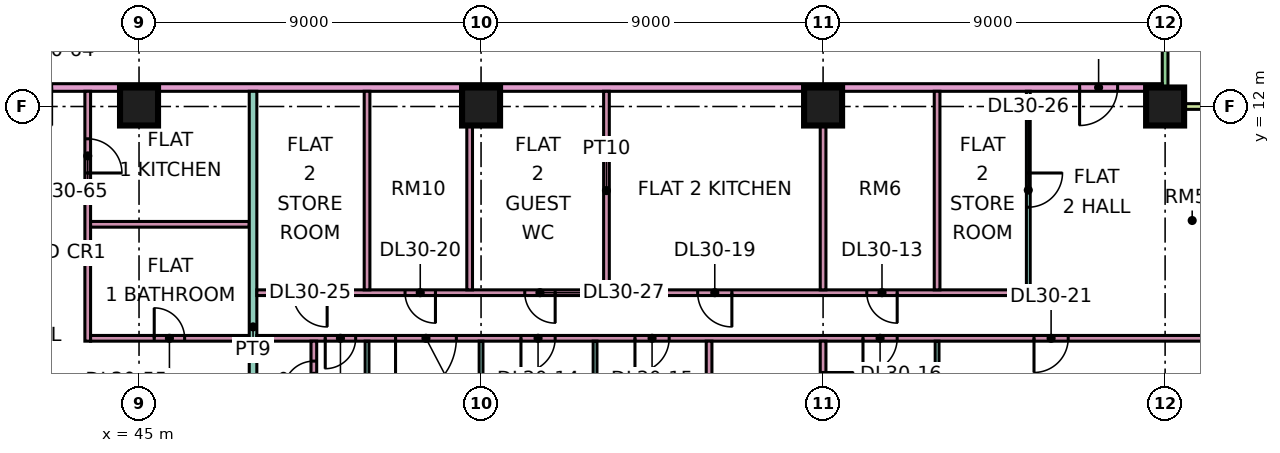
"""IFC4 building model, lengths in metres.
Left out: names, types, materials, properties, quantities, classifications, styles, units other than length and angle.
Written with IfcOpenShell. Run it as: python <this file> out.ifc"""

import sys

from ifc_helpers import new_model, si_unit, direction, frame, frame_2d, origin, origin_2d, place, context, subcontext, project, spatial, rectangle, extrude, element, fill, save


model = new_model("IFC4")
c1 = context("Model", 3, precision=1e-05, world=origin(), true_north=direction((0.0, 1.0)))
c2 = subcontext(c1, "Body", "Model", "MODEL_VIEW")
j1 = project(units=[si_unit("LENGTHUNIT", "METRE"), si_unit("PLANEANGLEUNIT", "RADIAN")], contexts=[c1])
p1 = place(None, origin())
s1 = spatial("IfcSite", under=j1, at=p1, CompositionType="ELEMENT")
p2 = place(p1, origin())
s2 = spatial("IfcBuilding", under=s1, at=p2, CompositionType="ELEMENT")
p3 = place(p2, frame((0.0, 0.0, 129.4)))
s3 = spatial("IfcBuildingStorey", under=s2, at=p3, CompositionType="ELEMENT", Elevation=129.4)
for number, where, z_axis, x_axis in (
    (1, (45.0, 12.0, 0.0), (0.0, 0.0, 1.0), (1.0, 0.0, 0.0)),
    (2, (54.0, 12.0, 0.0), (0.0, 0.0, 1.0), (1.0, 0.0, 0.0)),
    (3, (63.0, 12.0, 0.0), (0.0, 0.0, 1.0), (1.0, 0.0, 0.0)),
    (4, (72.0, 12.0, 0.0), (0.0, 0.0, 1.0), (1.0, 0.0, 0.0)),
):
    element("IfcColumn", number, at=place(p3, frame(where, z_axis=z_axis, x_axis=x_axis)), inside=s3, PredefinedType="COLUMN", context=c2, shape_type="SweptSolid", body=[
        extrude(rectangle(XDim=1.0, YDim=1.0, at=origin_2d()), origin(), (0.0, 0.0, 1.0), 3.75),
    ])
p4 = place(p3, frame((72.0, 12.075, 0.0), z_axis=(0.0, 0.0, 1.0), x_axis=(0.0, 1.0, 0.0)))
e5 = element("IfcWall", 5, at=p4, inside=s3, PredefinedType="SOLIDWALL", context=c2, shape_type="SweptSolid", body=[
    extrude(rectangle(XDim=10.35, YDim=0.15, at=frame_2d((5.175, 0.0))), origin(), (0.0, 0.0, 1.0), 3.35),
])
p5 = place(p4, frame((4.275, 0.0, 1.7)))
e6 = element("IfcOpeningElement", 6, at=p5, cuts=e5, PredefinedType="OPENING", context=c2, shape_type="SweptSolid", body=[
    extrude(rectangle(XDim=1.2, YDim=0.9, at=frame_2d((0.6, 0.45))), frame((0.0, 0.085, 0.0), z_axis=(0.0, -1.0, 0.0), x_axis=(1.0, 0.0, 0.0)), (0.0, 0.0, 1.0), 0.17),
])
p6 = place(p4, frame((7.988, 0.0, 0.45)))
e7 = element("IfcOpeningElement", 7, at=p6, cuts=e5, PredefinedType="OPENING", context=c2, shape_type="SweptSolid", body=[
    extrude(rectangle(XDim=1.8, YDim=2.4, at=frame_2d((0.9, 1.2))), frame((0.0, 0.085, 0.0), z_axis=(0.0, -1.0, 0.0), x_axis=(1.0, 0.0, 0.0)), (0.0, 0.0, 1.0), 0.17),
])
p7 = place(p3, frame((73.5, 12.0, 0.0), z_axis=(0.0, 0.0, 1.0), x_axis=(-1.0, 0.0, 0.0)))
e8 = element("IfcWall", 8, at=p7, inside=s3, PredefinedType="SOLIDWALL", context=c2, shape_type="SweptSolid", body=[
    extrude(rectangle(XDim=1.5, YDim=0.15, at=frame_2d((0.75, 0.0))), origin(), (0.0, 0.0, 1.0), 3.35),
])
p8 = place(p3, frame((40.65, 12.5, 0.0), z_axis=(0.0, 0.0, 1.0), x_axis=(1.0, 0.0, 0.0)))
e9 = element("IfcWall", 9, at=p8, inside=s3, PredefinedType="PARTITIONING", context=c2, shape_type="SweptSolid", body=[
    extrude(rectangle(XDim=31.276, YDim=0.2, at=frame_2d((15.638, 0.0))), origin(), (0.0, 0.0, 1.0), 3.35),
])
p9 = place(p8, frame((29.1, 0.0, 0.0)))
e10 = element("IfcOpeningElement", 10, at=p9, cuts=e9, PredefinedType="OPENING", context=c2, shape_type="SweptSolid", body=[
    extrude(rectangle(XDim=1.0, YDim=2.1, at=frame_2d((0.5, 1.05))), frame((0.0, 0.11, 0.0), z_axis=(0.0, -1.0, 0.0), x_axis=(1.0, 0.0, 0.0)), (0.0, 0.0, 1.0), 0.22),
])
p10 = place(p8, frame((1.05, 0.0, 0.0)))
e11 = element("IfcOpeningElement", 11, at=p10, cuts=e9, PredefinedType="OPENING", context=c2, shape_type="SweptSolid", body=[
    extrude(rectangle(XDim=1.0, YDim=2.1, at=frame_2d((0.5, 1.05))), frame((0.0, 0.11, 0.0), z_axis=(0.0, -1.0, 0.0), x_axis=(1.0, 0.0, 0.0)), (0.0, 0.0, 1.0), 0.22),
])
p11 = place(p3, frame((43.65, 5.825, 0.0), z_axis=(0.0, 0.0, 1.0), x_axis=(0.0, 1.0, 0.0)))
e12 = element("IfcWall", 12, at=p11, inside=s3, PredefinedType="PARTITIONING", context=c2, shape_type="SweptSolid", body=[
    extrude(rectangle(XDim=6.575, YDim=0.15, at=frame_2d((3.288, 0.0))), origin(), (0.0, 0.0, 1.0), 3.35),
])
p12 = place(p11, frame((4.425, 0.0, 0.0)))
e13 = element("IfcOpeningElement", 13, at=p12, cuts=e12, PredefinedType="OPENING", context=c2, shape_type="SweptSolid", body=[
    extrude(rectangle(XDim=0.9, YDim=2.1, at=frame_2d((0.45, 1.05))), frame((0.0, 0.085, 0.0), z_axis=(0.0, -1.0, 0.0), x_axis=(1.0, 0.0, 0.0)), (0.0, 0.0, 1.0), 0.17),
])
p13 = place(p3, frame((43.725, 5.9, 0.0), z_axis=(0.0, 0.0, 1.0), x_axis=(1.0, 0.0, 0.0)))
e14 = element("IfcWall", 14, at=p13, inside=s3, PredefinedType="PARTITIONING", context=c2, shape_type="SweptSolid", body=[
    extrude(rectangle(XDim=4.175, YDim=0.15, at=frame_2d((2.087, 0.0))), origin(), (0.0, 0.0, 1.0), 3.35),
])
p14 = place(p13, frame((1.675, 0.0, 0.0)))
e15 = element("IfcOpeningElement", 15, at=p14, cuts=e14, PredefinedType="OPENING", context=c2, shape_type="SweptSolid", body=[
    extrude(rectangle(XDim=0.8, YDim=2.1, at=frame_2d((0.4, 1.05))), frame((0.0, 0.085, 0.0), z_axis=(0.0, -1.0, 0.0), x_axis=(1.0, 0.0, 0.0)), (0.0, 0.0, 1.0), 0.17),
])
p15 = place(p3, frame((43.725, 8.9, 0.0), z_axis=(0.0, 0.0, 1.0), x_axis=(1.0, 0.0, 0.0)))
e16 = element("IfcWall", 16, at=p15, inside=s3, PredefinedType="PARTITIONING", context=c2, shape_type="SweptSolid", body=[
    extrude(rectangle(XDim=4.175, YDim=0.15, at=frame_2d((2.087, 0.0))), origin(), (0.0, 0.0, 1.0), 3.35),
])
p16 = place(p3, frame((48.0, 0.0, 0.0), z_axis=(0.0, 0.0, 1.0), x_axis=(0.0, 1.0, 0.0)))
e17 = element("IfcWall", 17, at=p16, inside=s3, PredefinedType="PARTITIONING", context=c2, shape_type="SweptSolid", body=[
    extrude(rectangle(XDim=12.4, YDim=0.2, at=frame_2d((6.2, 0.0))), origin(), (0.0, 0.0, 1.0), 3.35),
])
p17 = place(p3, frame((48.1, 5.9, 0.0), z_axis=(0.0, 0.0, 1.0), x_axis=(1.0, 0.0, 0.0)))
e18 = element("IfcWall", 18, at=p17, inside=s3, PredefinedType="PARTITIONING", context=c2, shape_type="SweptSolid", body=[
    extrude(rectangle(XDim=25.25, YDim=0.15, at=frame_2d((12.625, 0.0))), origin(), (0.0, 0.0, 1.0), 3.35),
])
p18 = place(p17, frame((6.95, 0.0, 0.0)))
e19 = element("IfcOpeningElement", 19, at=p18, cuts=e18, PredefinedType="OPENING", context=c2, shape_type="SweptSolid", body=[
    extrude(rectangle(XDim=0.9, YDim=2.1, at=frame_2d((0.45, 1.05))), frame((0.0, 0.085, 0.0), z_axis=(0.0, -1.0, 0.0), x_axis=(1.0, 0.0, 0.0)), (0.0, 0.0, 1.0), 0.17),
])
p19 = place(p17, frame((9.95, 0.0, 0.0)))
e20 = element("IfcOpeningElement", 20, at=p19, cuts=e18, PredefinedType="OPENING", context=c2, shape_type="SweptSolid", body=[
    extrude(rectangle(XDim=0.9, YDim=2.1, at=frame_2d((0.45, 1.05))), frame((0.0, 0.085, 0.0), z_axis=(0.0, -1.0, 0.0), x_axis=(1.0, 0.0, 0.0)), (0.0, 0.0, 1.0), 0.17),
])
p20 = place(p17, frame((15.95, 0.0, 0.0)))
e21 = element("IfcOpeningElement", 21, at=p20, cuts=e18, PredefinedType="OPENING", context=c2, shape_type="SweptSolid", body=[
    extrude(rectangle(XDim=0.9, YDim=2.1, at=frame_2d((0.45, 1.05))), frame((0.0, 0.085, 0.0), z_axis=(0.0, -1.0, 0.0), x_axis=(1.0, 0.0, 0.0)), (0.0, 0.0, 1.0), 0.17),
])
p21 = place(p17, frame((20.45, 0.0, 0.0)))
e22 = element("IfcOpeningElement", 22, at=p21, cuts=e18, PredefinedType="OPENING", context=c2, shape_type="SweptSolid", body=[
    extrude(rectangle(XDim=0.9, YDim=2.1, at=frame_2d((0.45, 1.05))), frame((0.0, 0.085, 0.0), z_axis=(0.0, -1.0, 0.0), x_axis=(1.0, 0.0, 0.0)), (0.0, 0.0, 1.0), 0.17),
])
p22 = place(p17, frame((1.8, 0.0, 0.0)))
e23 = element("IfcOpeningElement", 23, at=p22, cuts=e18, PredefinedType="OPENING", context=c2, shape_type="SweptSolid", body=[
    extrude(rectangle(XDim=0.8, YDim=2.1, at=frame_2d((0.4, 1.05))), frame((0.0, 0.085, 0.0), z_axis=(0.0, -1.0, 0.0), x_axis=(1.0, 0.0, 0.0)), (0.0, 0.0, 1.0), 0.17),
])
p23 = place(p17, frame((3.65, 0.0, 0.0)))
e24 = element("IfcOpeningElement", 24, at=p23, cuts=e18, PredefinedType="OPENING", context=c2, shape_type="SweptSolid", body=[
    extrude(rectangle(XDim=1.6, YDim=2.1, at=frame_2d((0.8, 1.05))), frame((0.0, 0.085, 0.0), z_axis=(0.0, -1.0, 0.0), x_axis=(1.0, 0.0, 0.0)), (0.0, 0.0, 1.0), 0.17),
])
p24 = place(p3, frame((48.1, 7.1, 0.0), z_axis=(0.0, 0.0, 1.0), x_axis=(1.0, 0.0, 0.0)))
e25 = element("IfcWall", 25, at=p24, inside=s3, PredefinedType="PARTITIONING", context=c2, shape_type="SweptSolid", body=[
    extrude(rectangle(XDim=20.35, YDim=0.15, at=frame_2d((10.175, 0.0))), origin(), (0.0, 0.0, 1.0), 3.35),
])
p25 = place(p24, frame((16.05, 0.0, 0.0)))
e26 = element("IfcOpeningElement", 26, at=p25, cuts=e25, PredefinedType="OPENING", context=c2, shape_type="SweptSolid", body=[
    extrude(rectangle(XDim=0.8, YDim=2.1, at=frame_2d((0.4, 1.05))), frame((0.0, 0.085, 0.0), z_axis=(0.0, -1.0, 0.0), x_axis=(1.0, 0.0, 0.0)), (0.0, 0.0, 1.0), 0.17),
])
p26 = place(p24, frame((11.6, 0.0, 0.0)))
e27 = element("IfcOpeningElement", 27, at=p26, cuts=e25, PredefinedType="OPENING", context=c2, shape_type="SweptSolid", body=[
    extrude(rectangle(XDim=0.9, YDim=2.1, at=frame_2d((0.45, 1.05))), frame((0.0, 0.085, 0.0), z_axis=(0.0, -1.0, 0.0), x_axis=(1.0, 0.0, 0.0)), (0.0, 0.0, 1.0), 0.17),
])
p27 = place(p24, frame((3.9, 0.0, 0.0)))
e28 = element("IfcOpeningElement", 28, at=p27, cuts=e25, PredefinedType="OPENING", context=c2, shape_type="SweptSolid", body=[
    extrude(rectangle(XDim=0.8, YDim=2.1, at=frame_2d((0.4, 1.05))), frame((0.0, 0.085, 0.0), z_axis=(0.0, -1.0, 0.0), x_axis=(1.0, 0.0, 0.0)), (0.0, 0.0, 1.0), 0.17),
])
p28 = place(p24, frame((0.95, 0.0, 0.0)))
e29 = element("IfcOpeningElement", 29, at=p28, cuts=e25, PredefinedType="OPENING", context=c2, shape_type="SweptSolid", body=[
    extrude(rectangle(XDim=0.9, YDim=2.1, at=frame_2d((0.45, 1.05))), frame((0.0, 0.085, 0.0), z_axis=(0.0, -1.0, 0.0), x_axis=(1.0, 0.0, 0.0)), (0.0, 0.0, 1.0), 0.17),
])
p29 = place(p24, frame((7.05, 0.0, 0.0)))
e30 = element("IfcOpeningElement", 30, at=p29, cuts=e25, PredefinedType="OPENING", context=c2, shape_type="SweptSolid", body=[
    extrude(rectangle(XDim=0.8, YDim=2.1, at=frame_2d((0.4, 1.05))), frame((0.0, 0.085, 0.0), z_axis=(0.0, -1.0, 0.0), x_axis=(1.0, 0.0, 0.0)), (0.0, 0.0, 1.0), 0.17),
])
p30 = place(p3, frame((49.6, 3.825, 0.0), z_axis=(0.0, 0.0, 1.0), x_axis=(0.0, 1.0, 0.0)))
e31 = element("IfcWall", 31, at=p30, inside=s3, PredefinedType="PARTITIONING", context=c2, shape_type="SweptSolid", body=[
    extrude(rectangle(XDim=2.0, YDim=0.15, at=frame_2d((1.0, 0.0))), origin(), (0.0, 0.0, 1.0), 3.35),
])
p31 = place(p30, frame((0.675, 0.0, 0.0)))
e32 = element("IfcOpeningElement", 32, at=p31, cuts=e31, PredefinedType="OPENING", context=c2, shape_type="SweptSolid", body=[
    extrude(rectangle(XDim=0.8, YDim=2.1, at=frame_2d((0.4, 1.05))), frame((0.0, 0.085, 0.0), z_axis=(0.0, -1.0, 0.0), x_axis=(1.0, 0.0, 0.0)), (0.0, 0.0, 1.0), 0.17),
])
p32 = place(p3, frame((51.0, -1.351, 0.0), z_axis=(0.0, 0.0, 1.0), x_axis=(0.0, 1.0, 0.0)))
e33 = element("IfcWall", 33, at=p32, inside=s3, PredefinedType="PARTITIONING", context=c2, shape_type="SweptSolid", body=[
    extrude(rectangle(XDim=7.176, YDim=0.1, at=frame_2d((3.588, 0.0))), origin(), (0.0, 0.0, 1.0), 3.35),
])
for number, where, z_axis, x_axis in (
    (34, (51.0, 7.175, 0.0), (0.0, 0.0, 1.0), (0.0, 1.0, 0.0)),
    (35, (53.7, 7.175, 0.0), (0.0, 0.0, 1.0), (0.0, 1.0, 0.0)),
):
    element("IfcWall", number, at=place(p3, frame(where, z_axis=z_axis, x_axis=x_axis)), inside=s3, PredefinedType="PARTITIONING", context=c2, shape_type="SweptSolid", body=[
        extrude(rectangle(XDim=5.225, YDim=0.15, at=frame_2d((2.612, 0.0))), origin(), (0.0, 0.0, 1.0), 3.35),
    ])
for number, where, z_axis, x_axis in (
    (36, (54.0, -1.351, 0.0), (0.0, 0.0, 1.0), (0.0, 1.0, 0.0)),
    (37, (57.0, -1.351, 0.0), (0.0, 0.0, 1.0), (0.0, 1.0, 0.0)),
):
    element("IfcWall", number, at=place(p3, frame(where, z_axis=z_axis, x_axis=x_axis)), inside=s3, PredefinedType="PARTITIONING", context=c2, shape_type="SweptSolid", body=[
        extrude(rectangle(XDim=7.176, YDim=0.1, at=frame_2d((3.588, 0.0))), origin(), (0.0, 0.0, 1.0), 3.35),
    ])
p33 = place(p3, frame((57.3, 7.175, 0.0), z_axis=(0.0, 0.0, 1.0), x_axis=(0.0, 1.0, 0.0)))
e38 = element("IfcWall", 38, at=p33, inside=s3, PredefinedType="PARTITIONING", context=c2, shape_type="SweptSolid", body=[
    extrude(rectangle(XDim=5.225, YDim=0.15, at=frame_2d((2.612, 0.0))), origin(), (0.0, 0.0, 1.0), 3.35),
])
p34 = place(p3, frame((60.0, 0.0, 0.0), z_axis=(0.0, 0.0, 1.0), x_axis=(0.0, 1.0, 0.0)))
e39 = element("IfcWall", 39, at=p34, inside=s3, PredefinedType="PARTITIONING", context=c2, shape_type="SweptSolid", body=[
    extrude(rectangle(XDim=5.825, YDim=0.15, at=frame_2d((2.913, 0.0))), origin(), (0.0, 0.0, 1.0), 3.35),
])
p35 = place(p3, frame((63.0, 3.375, 0.0), z_axis=(0.0, 0.0, 1.0), x_axis=(0.0, 1.0, 0.0)))
e40 = element("IfcWall", 40, at=p35, inside=s3, PredefinedType="PARTITIONING", context=c2, shape_type="SweptSolid", body=[
    extrude(rectangle(XDim=2.45, YDim=0.15, at=frame_2d((1.225, 0.0))), origin(), (0.0, 0.0, 1.0), 3.35),
])
p36 = place(p35, frame((0.825, 0.0, 0.0)))
e41 = element("IfcOpeningElement", 41, at=p36, cuts=e40, PredefinedType="OPENING", context=c2, shape_type="SweptSolid", body=[
    extrude(rectangle(XDim=0.8, YDim=2.1, at=frame_2d((0.4, 1.05))), frame((0.0, 0.085, 0.0), z_axis=(0.0, -1.0, 0.0), x_axis=(1.0, 0.0, 0.0)), (0.0, 0.0, 1.0), 0.17),
])
p37 = place(p3, frame((63.0, 7.175, 0.0), z_axis=(0.0, 0.0, 1.0), x_axis=(0.0, 1.0, 0.0)))
e42 = element("IfcWall", 42, at=p37, inside=s3, PredefinedType="PARTITIONING", context=c2, shape_type="SweptSolid", body=[
    extrude(rectangle(XDim=5.225, YDim=0.15, at=frame_2d((2.612, 0.0))), origin(), (0.0, 0.0, 1.0), 3.35),
])
p38 = place(p3, frame((66.0, 0.074, 0.0), z_axis=(0.0, 0.0, 1.0), x_axis=(0.0, 1.0, 0.0)))
e43 = element("IfcWall", 43, at=p38, inside=s3, PredefinedType="PARTITIONING", context=c2, shape_type="SweptSolid", body=[
    extrude(rectangle(XDim=5.751, YDim=0.1, at=frame_2d((2.875, 0.0))), origin(), (0.0, 0.0, 1.0), 3.35),
])
p39 = place(p3, frame((66.0, 7.175, 0.0), z_axis=(0.0, 0.0, 1.0), x_axis=(0.0, 1.0, 0.0)))
e44 = element("IfcWall", 44, at=p39, inside=s3, PredefinedType="PARTITIONING", context=c2, shape_type="SweptSolid", body=[
    extrude(rectangle(XDim=5.225, YDim=0.15, at=frame_2d((2.612, 0.0))), origin(), (0.0, 0.0, 1.0), 3.35),
])
p40 = place(p3, frame((68.4, 7.175, 0.0), z_axis=(0.0, 0.0, 1.0), x_axis=(0.0, 1.0, 0.0)))
e45 = element("IfcWall", 45, at=p40, inside=s3, PredefinedType="PARTITIONING", context=c2, shape_type="SweptSolid", body=[
    extrude(rectangle(XDim=5.225, YDim=0.1, at=frame_2d((2.612, 0.0))), origin(), (0.0, 0.0, 1.0), 3.35),
])
p41 = place(p40, frame((2.175, 0.0, 0.0)))
e46 = element("IfcOpeningElement", 46, at=p41, cuts=e45, PredefinedType="OPENING", context=c2, shape_type="SweptSolid", body=[
    extrude(rectangle(XDim=0.9, YDim=2.1, at=frame_2d((0.45, 1.05))), frame((0.0, 0.06, 0.0), z_axis=(0.0, -1.0, 0.0), x_axis=(1.0, 0.0, 0.0)), (0.0, 0.0, 1.0), 0.12),
])
p42 = place(p25, origin())
e47 = element("IfcDoor", 47, at=p42, inside=s3, OperationType="SINGLE_SWING_RIGHT", PredefinedType="DOOR", context=c2, shape_type="SweptSolid", body=[
    extrude(rectangle(XDim=0.8, YDim=2.1, at=frame_2d((0.4, 1.05))), frame((0.0, 0.025, 0.0), z_axis=(0.0, -1.0, 0.0), x_axis=(1.0, 0.0, 0.0)), (0.0, 0.0, 1.0), 0.05),
])
fill(e26, e47)
p43 = place(p18, frame((0.9, 0.0, 0.0), z_axis=(0.0, 0.0, 1.0), x_axis=(-1.0, 0.0, 0.0)))
e48 = element("IfcDoor", 48, at=p43, inside=s3, OperationType="SINGLE_SWING_LEFT", PredefinedType="DOOR", context=c2, shape_type="SweptSolid", body=[
    extrude(rectangle(XDim=0.9, YDim=2.1, at=frame_2d((0.45, 1.05))), frame((0.0, 0.025, 0.0), z_axis=(0.0, -1.0, 0.0), x_axis=(1.0, 0.0, 0.0)), (0.0, 0.0, 1.0), 0.05),
])
fill(e19, e48)
p44 = place(p19, frame((0.9, 0.0, 0.0), z_axis=(0.0, 0.0, 1.0), x_axis=(-1.0, 0.0, 0.0)))
e49 = element("IfcDoor", 49, at=p44, inside=s3, OperationType="SINGLE_SWING_LEFT", PredefinedType="DOOR", context=c2, shape_type="SweptSolid", body=[
    extrude(rectangle(XDim=0.9, YDim=2.1, at=frame_2d((0.45, 1.05))), frame((0.0, 0.025, 0.0), z_axis=(0.0, -1.0, 0.0), x_axis=(1.0, 0.0, 0.0)), (0.0, 0.0, 1.0), 0.05),
])
fill(e20, e49)
p45 = place(p20, frame((0.9, 0.0, 0.0), z_axis=(0.0, 0.0, 1.0), x_axis=(-1.0, 0.0, 0.0)))
e50 = element("IfcDoor", 50, at=p45, inside=s3, OperationType="SINGLE_SWING_LEFT", PredefinedType="DOOR", context=c2, shape_type="SweptSolid", body=[
    extrude(rectangle(XDim=0.9, YDim=2.1, at=frame_2d((0.45, 1.05))), frame((0.0, 0.025, 0.0), z_axis=(0.0, -1.0, 0.0), x_axis=(1.0, 0.0, 0.0)), (0.0, 0.0, 1.0), 0.05),
])
fill(e21, e50)
p46 = place(p36, origin())
e51 = element("IfcDoor", 51, at=p46, inside=s3, OperationType="SINGLE_SWING_RIGHT", PredefinedType="DOOR", context=c2, shape_type="SweptSolid", body=[
    extrude(rectangle(XDim=0.8, YDim=2.1, at=frame_2d((0.4, 1.05))), frame((0.0, 0.025, 0.0), z_axis=(0.0, -1.0, 0.0), x_axis=(1.0, 0.0, 0.0)), (0.0, 0.0, 1.0), 0.05),
])
fill(e41, e51)
p47 = place(p9, frame((1.0, 0.0, 0.0), z_axis=(0.0, 0.0, 1.0), x_axis=(-1.0, 0.0, 0.0)))
e52 = element("IfcDoor", 52, at=p47, inside=s3, OperationType="SINGLE_SWING_LEFT", PredefinedType="DOOR", context=c2, shape_type="SweptSolid", body=[
    extrude(rectangle(XDim=1.0, YDim=2.1, at=frame_2d((0.5, 1.05))), frame((0.0, 0.025, 0.0), z_axis=(0.0, -1.0, 0.0), x_axis=(1.0, 0.0, 0.0)), (0.0, 0.0, 1.0), 0.05),
])
fill(e10, e52)
p48 = place(p26, origin())
e53 = element("IfcDoor", 53, at=p48, inside=s3, OperationType="SINGLE_SWING_RIGHT", PredefinedType="DOOR", context=c2, shape_type="SweptSolid", body=[
    extrude(rectangle(XDim=0.9, YDim=2.1, at=frame_2d((0.45, 1.05))), frame((0.0, 0.025, 0.0), z_axis=(0.0, -1.0, 0.0), x_axis=(1.0, 0.0, 0.0)), (0.0, 0.0, 1.0), 0.05),
])
fill(e27, e53)
p49 = place(p27, origin())
e54 = element("IfcDoor", 54, at=p49, inside=s3, OperationType="SINGLE_SWING_RIGHT", PredefinedType="DOOR", context=c2, shape_type="SweptSolid", body=[
    extrude(rectangle(XDim=0.8, YDim=2.1, at=frame_2d((0.4, 1.05))), frame((0.0, 0.025, 0.0), z_axis=(0.0, -1.0, 0.0), x_axis=(1.0, 0.0, 0.0)), (0.0, 0.0, 1.0), 0.05),
])
fill(e28, e54)
p50 = place(p21, frame((0.9, 0.0, 0.0), z_axis=(0.0, 0.0, 1.0), x_axis=(-1.0, 0.0, 0.0)))
e55 = element("IfcDoor", 55, at=p50, inside=s3, OperationType="SINGLE_SWING_LEFT", PredefinedType="DOOR", context=c2, shape_type="SweptSolid", body=[
    extrude(rectangle(XDim=0.9, YDim=2.1, at=frame_2d((0.45, 1.05))), frame((0.0, 0.025, 0.0), z_axis=(0.0, -1.0, 0.0), x_axis=(1.0, 0.0, 0.0)), (0.0, 0.0, 1.0), 0.05),
])
fill(e22, e55)
p51 = place(p22, frame((0.8, 0.0, 0.0), z_axis=(0.0, 0.0, 1.0), x_axis=(-1.0, 0.0, 0.0)))
e56 = element("IfcDoor", 56, at=p51, inside=s3, OperationType="SINGLE_SWING_LEFT", PredefinedType="DOOR", context=c2, shape_type="SweptSolid", body=[
    extrude(rectangle(XDim=0.8, YDim=2.1, at=frame_2d((0.4, 1.05))), frame((0.0, 0.025, 0.0), z_axis=(0.0, -1.0, 0.0), x_axis=(1.0, 0.0, 0.0)), (0.0, 0.0, 1.0), 0.05),
])
fill(e23, e56)
p52 = place(p31, origin())
e57 = element("IfcDoor", 57, at=p52, inside=s3, OperationType="SINGLE_SWING_LEFT", PredefinedType="DOOR", context=c2, shape_type="SweptSolid", body=[
    extrude(rectangle(XDim=0.8, YDim=2.1, at=frame_2d((0.4, 1.05))), frame((0.0, 0.025, 0.0), z_axis=(0.0, -1.0, 0.0), x_axis=(1.0, 0.0, 0.0)), (0.0, 0.0, 1.0), 0.05),
])
fill(e32, e57)
p53 = place(p23, frame((1.6, 0.0, 0.0), z_axis=(0.0, 0.0, 1.0), x_axis=(-1.0, 0.0, 0.0)))
e58 = element("IfcDoor", 58, at=p53, inside=s3, OperationType="DOUBLE_DOOR_SINGLE_SWING", PredefinedType="DOOR", context=c2, shape_type="SweptSolid", body=[
    extrude(rectangle(XDim=1.6, YDim=2.1, at=frame_2d((0.8, 1.05))), frame((0.0, 0.025, 0.0), z_axis=(0.0, -1.0, 0.0), x_axis=(1.0, 0.0, 0.0)), (0.0, 0.0, 1.0), 0.05),
])
fill(e24, e58)
p54 = place(p28, origin())
e59 = element("IfcDoor", 59, at=p54, inside=s3, OperationType="SINGLE_SWING_RIGHT", PredefinedType="DOOR", context=c2, shape_type="SweptSolid", body=[
    extrude(rectangle(XDim=0.9, YDim=2.1, at=frame_2d((0.45, 1.05))), frame((0.0, 0.025, 0.0), z_axis=(0.0, -1.0, 0.0), x_axis=(1.0, 0.0, 0.0)), (0.0, 0.0, 1.0), 0.05),
])
fill(e29, e59)
p55 = place(p41, origin())
e60 = element("IfcDoor", 60, at=p55, inside=s3, OperationType="SINGLE_SWING_RIGHT", PredefinedType="DOOR", context=c2, shape_type="SweptSolid", body=[
    extrude(rectangle(XDim=0.9, YDim=2.1, at=frame_2d((0.45, 1.05))), frame((0.0, 0.025, 0.0), z_axis=(0.0, -1.0, 0.0), x_axis=(1.0, 0.0, 0.0)), (0.0, 0.0, 1.0), 0.05),
])
fill(e46, e60)
p56 = place(p29, origin())
e61 = element("IfcDoor", 61, at=p56, inside=s3, OperationType="SINGLE_SWING_RIGHT", PredefinedType="DOOR", context=c2, shape_type="SweptSolid", body=[
    extrude(rectangle(XDim=0.8, YDim=2.1, at=frame_2d((0.4, 1.05))), frame((0.0, 0.025, 0.0), z_axis=(0.0, -1.0, 0.0), x_axis=(1.0, 0.0, 0.0)), (0.0, 0.0, 1.0), 0.05),
])
fill(e30, e61)
p57 = place(p14, origin())
e62 = element("IfcDoor", 62, at=p57, inside=s3, OperationType="SINGLE_SWING_LEFT", PredefinedType="DOOR", context=c2, shape_type="SweptSolid", body=[
    extrude(rectangle(XDim=0.8, YDim=2.1, at=frame_2d((0.4, 1.05))), frame((0.0, 0.025, 0.0), z_axis=(0.0, -1.0, 0.0), x_axis=(1.0, 0.0, 0.0)), (0.0, 0.0, 1.0), 0.05),
])
fill(e15, e62)
p58 = place(p12, frame((0.9, 0.0, 0.0), z_axis=(0.0, 0.0, 1.0), x_axis=(-1.0, 0.0, 0.0)))
e63 = element("IfcDoor", 63, at=p58, inside=s3, OperationType="SINGLE_SWING_LEFT", PredefinedType="DOOR", context=c2, shape_type="SweptSolid", body=[
    extrude(rectangle(XDim=0.9, YDim=2.1, at=frame_2d((0.45, 1.05))), frame((0.0, 0.025, 0.0), z_axis=(0.0, -1.0, 0.0), x_axis=(1.0, 0.0, 0.0)), (0.0, 0.0, 1.0), 0.05),
])
fill(e13, e63)
save(model, sys.argv[1])
